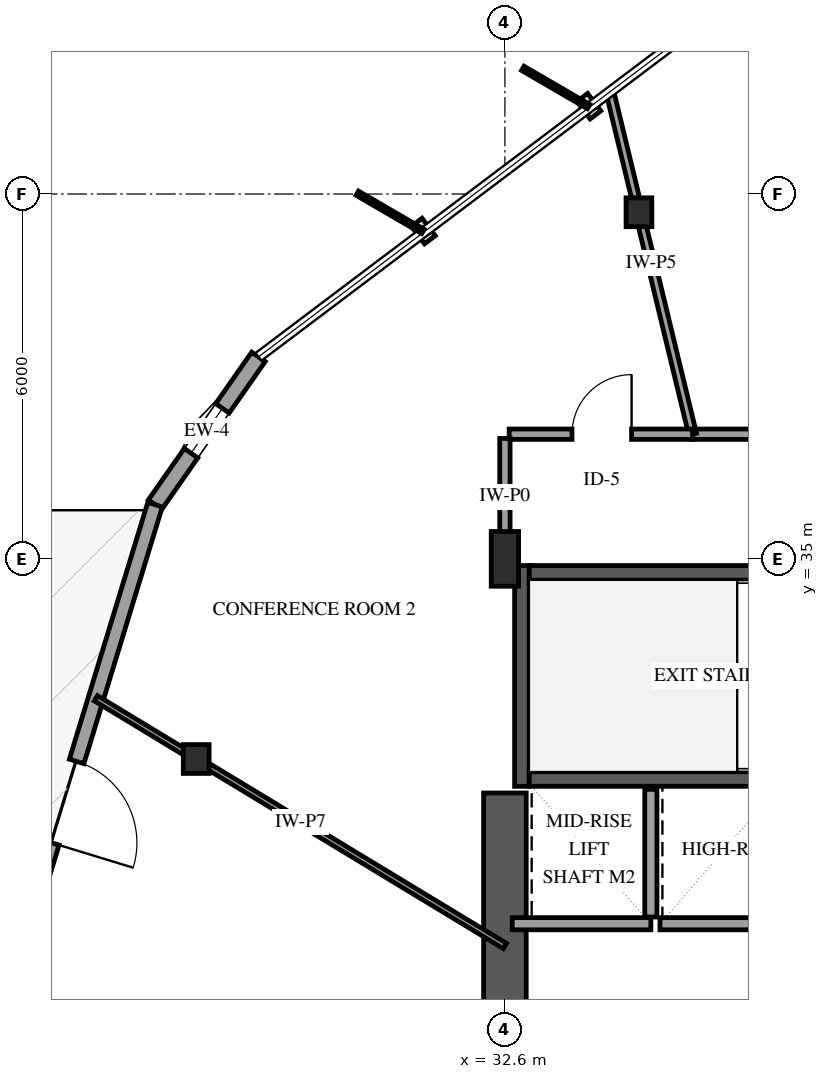
"""IFC4 building model, lengths in metres.
Left out: names, types, materials, properties, quantities, classifications, styles, units other than length and angle.
Written with IfcOpenShell. Run it as: python <this file> out.ifc"""

import sys

from ifc_helpers import new_model, si_unit, direction, frame, frame_2d, origin, origin_2d, place, context, subcontext, project, spatial, rectangle, i_section, extrude, element, fill, save


model = new_model("IFC4")
c1 = context("Model", 3, precision=1e-05, world=origin(), true_north=direction((0.0, 1.0)))
c2 = subcontext(c1, "Body", "Model", "MODEL_VIEW")
j1 = project(units=[si_unit("LENGTHUNIT", "METRE"), si_unit("PLANEANGLEUNIT", "RADIAN")], contexts=[c1])
p1 = place(None, origin())
s1 = spatial("IfcSite", under=j1, at=p1, CompositionType="ELEMENT")
p2 = place(p1, origin())
s2 = spatial("IfcBuilding", under=s1, at=p2, CompositionType="ELEMENT")
p3 = place(p2, frame((0.0, 0.0, 30.6)))
s3 = spatial("IfcBuildingStorey", under=s2, at=p3, CompositionType="ELEMENT", Elevation=30.6)
p4 = place(p3, frame((32.88, 31.26, 0.0), z_axis=(0.0, 0.0, 1.0), x_axis=(0.0, 1.0, 0.0)))
e1 = element("IfcWall", 1, at=p4, inside=s3, PredefinedType="SHEAR", context=c2, shape_type="SweptSolid", body=[
    extrude(rectangle(XDim=3.63, YDim=0.24, at=frame_2d((1.815, 0.0))), origin(), (0.0, 0.0, 1.0), 4.0),
])
for number, where, z_axis, x_axis in (
    (2, (33.0, 31.38, 0.0), (0.0, 0.0, 1.0), (1.0, 0.0, 0.0)),
    (3, (33.0, 34.77, 0.0), (0.0, 0.0, 1.0), (1.0, 0.0, 0.0)),
):
    element("IfcWall", number, at=place(p3, frame(where, z_axis=z_axis, x_axis=x_axis)), inside=s3, PredefinedType="SHEAR", context=c2, shape_type="SweptSolid", body=[
        extrude(rectangle(XDim=8.0, YDim=0.24, at=frame_2d((4.0, 0.0))), origin(), (0.0, 0.0, 1.0), 4.0),
    ])
p5 = place(p3, frame((32.6, 18.85, 0.0), z_axis=(0.0, 0.0, 1.0), x_axis=(0.0, 1.0, 0.0)))
e4 = element("IfcWall", 4, at=p5, inside=s3, PredefinedType="SHEAR", context=c2, shape_type="SweptSolid", body=[
    extrude(rectangle(XDim=12.3, YDim=0.7, at=frame_2d((6.15, 0.0))), origin(), (0.0, 0.0, 1.0), 4.0),
])
p6 = place(p3, frame((32.6, 35.0, -0.3), z_axis=(0.0, 0.0, 1.0), x_axis=(1.0, 0.0, 0.0)))
e5 = element("IfcColumn", 5, at=p6, inside=s3, PredefinedType="PILASTER", context=c2, shape_type="SweptSolid", body=[
    extrude(rectangle(XDim=0.45, YDim=0.9, at=origin_2d()), origin(), (0.0, 0.0, 1.0), 4.3),
])
for number, where, z_axis, x_axis in (
    (6, (34.804, 40.7, -0.3), (0.0, 0.0, 1.0), (1.0, 0.0, 0.0)),
    (7, (27.523, 31.708, -0.3), (0.0, 0.0, 1.0), (1.0, 0.0, 0.0)),
):
    element("IfcColumn", number, at=place(p3, frame(where, z_axis=z_axis, x_axis=x_axis)), inside=s3, PredefinedType="COLUMN", context=c2, shape_type="SweptSolid", body=[
        extrude(i_section(OverallWidth=0.424, OverallDepth=0.474, WebThickness=0.048, FlangeThickness=0.077, FilletRadius=0.038, at=origin_2d()), origin(), (0.0, 0.0, 1.0), 4.3),
    ])
p7 = place(p3, frame((28.547, 38.322, 0.0), z_axis=(0.0, 0.0, 1.0), x_axis=(-0.573285584338, -0.819355624128, 0.0)))
e8 = element("IfcWall", 8, at=p7, inside=s3, PredefinedType="SOLIDWALL", context=c2, shape_type="SweptSolid", body=[
    extrude(rectangle(XDim=2.967, YDim=0.27, at=frame_2d((1.483, 0.0))), origin(), (0.0, 0.0, 1.0), 3.079),
])
p8 = place(p7, frame((1.033, 0.0, 0.75)))
e9 = element("IfcOpeningElement", 9, at=p8, cuts=e8, PredefinedType="OPENING", context=c2, shape_type="SweptSolid", body=[
    extrude(rectangle(XDim=0.9, YDim=1.5, at=frame_2d((0.45, 0.75))), frame((0.0, 0.145, 0.0), z_axis=(0.0, -1.0, 0.0), x_axis=(1.0, 0.0, 0.0)), (0.0, 0.0, 1.0), 0.29),
])
p9 = place(p3, frame((26.846, 35.891, 0.0), z_axis=(0.0, 0.0, 1.0), x_axis=(-0.292034213335, -0.956407872323, 0.0)))
e10 = element("IfcWall", 10, at=p9, inside=s3, PredefinedType="SOLIDWALL", context=c2, shape_type="SweptSolid", body=[
    extrude(rectangle(XDim=10.23, YDim=0.25, at=frame_2d((5.115, 0.0))), origin(), (0.0, 0.0, 1.0), 3.079),
])
p10 = place(p9, frame((4.415, 0.0, 0.0)))
e11 = element("IfcOpeningElement", 11, at=p10, cuts=e10, PredefinedType="OPENING", context=c2, shape_type="SweptSolid", body=[
    extrude(rectangle(XDim=1.4, YDim=2.2, at=frame_2d((0.7, 1.1))), frame((0.0, 0.135, 0.0), z_axis=(0.0, -1.0, 0.0), x_axis=(1.0, 0.0, 0.0)), (0.0, 0.0, 1.0), 0.27),
])
p11 = place(p3, frame((32.72, 29.0, 0.0), z_axis=(0.0, 0.0, 1.0), x_axis=(1.0, 0.0, 0.0)))
e12 = element("IfcWall", 12, at=p11, inside=s3, PredefinedType="SOLIDWALL", context=c2, shape_type="SweptSolid", body=[
    extrude(rectangle(XDim=2.28, YDim=0.2, at=frame_2d((1.14, 0.0))), origin(), (0.0, 0.0, 1.0), 3.7),
])
p12 = place(p3, frame((35.0, 29.11, 0.0), z_axis=(0.0, 0.0, 1.0), x_axis=(0.0, 1.0, 0.0)))
e13 = element("IfcWall", 13, at=p12, inside=s3, PredefinedType="SOLIDWALL", context=c2, shape_type="SweptSolid", body=[
    extrude(rectangle(XDim=2.1, YDim=0.2, at=frame_2d((1.05, 0.0))), origin(), (0.0, 0.0, 1.0), 3.7),
])
p13 = place(p3, frame((35.15, 29.0, 0.0), z_axis=(0.0, 0.0, 1.0), x_axis=(1.0, 0.0, 0.0)))
e14 = element("IfcWall", 14, at=p13, inside=s3, PredefinedType="SOLIDWALL", context=c2, shape_type="SweptSolid", body=[
    extrude(rectangle(XDim=2.0, YDim=0.2, at=frame_2d((1.0, 0.0))), origin(), (0.0, 0.0, 1.0), 3.7),
])
p14 = place(p3, frame((35.687, 37.05, 0.0), z_axis=(0.0, 0.0, 1.0), x_axis=(1.0, 0.0, 0.0)))
e15 = element("IfcWall", 15, at=p14, inside=s3, PredefinedType="PARTITIONING", context=c2, shape_type="SweptSolid", body=[
    extrude(rectangle(XDim=10.893, YDim=0.17, at=frame_2d((5.447, 0.0))), origin(), (0.0, 0.0, 1.0), 3.7),
])
p15 = place(p14, frame((4.972, 0.0, 0.0)))
e16 = element("IfcOpeningElement", 16, at=p15, cuts=e15, PredefinedType="OPENING", context=c2, shape_type="SweptSolid", body=[
    extrude(rectangle(XDim=0.98, YDim=2.15, at=frame_2d((0.49, 1.075))), frame((0.0, 0.095, 0.0), z_axis=(0.0, -1.0, 0.0), x_axis=(1.0, 0.0, 0.0)), (0.0, 0.0, 1.0), 0.19),
])
p16 = place(p3, frame((32.6, 28.634, 0.0), z_axis=(0.0, 0.0, 1.0), x_axis=(-0.855390028233, 0.517984458839, 0.0)))
e17 = element("IfcWall", 17, at=p16, inside=s3, PredefinedType="PARTITIONING", context=c2, shape_type="SweptSolid", body=[
    extrude(rectangle(XDim=7.863, YDim=0.1, at=frame_2d((3.932, 0.0))), origin(), (0.0, 0.0, 1.0), 3.074),
])
p17 = place(p3, frame((35.687, 37.05, 0.0), z_axis=(0.0, 0.0, 1.0), x_axis=(-0.234990748456, 0.971997607065, 0.0)))
e18 = element("IfcWall", 18, at=p17, inside=s3, PredefinedType="PARTITIONING", context=c2, shape_type="SweptSolid", body=[
    extrude(rectangle(XDim=5.792, YDim=0.13, at=frame_2d((2.896, 0.0))), origin(), (0.0, 0.0, 1.0), 2.995),
])
p18 = place(p3, frame((32.67, 37.05, 0.0), z_axis=(0.0, 0.0, 1.0), x_axis=(1.0, 0.0, 0.0)))
e19 = element("IfcWall", 19, at=p18, inside=s3, PredefinedType="PARTITIONING", context=c2, shape_type="SweptSolid", body=[
    extrude(rectangle(XDim=3.017, YDim=0.17, at=frame_2d((1.509, 0.0))), origin(), (0.0, 0.0, 1.0), 3.7),
])
p19 = place(p18, frame((1.033, 0.0, 0.0)))
e20 = element("IfcOpeningElement", 20, at=p19, cuts=e19, PredefinedType="OPENING", context=c2, shape_type="SweptSolid", body=[
    extrude(rectangle(XDim=0.98, YDim=2.15, at=frame_2d((0.49, 1.075))), frame((0.0, 0.095, 0.0), z_axis=(0.0, -1.0, 0.0), x_axis=(1.0, 0.0, 0.0)), (0.0, 0.0, 1.0), 0.19),
])
p20 = place(p3, frame((32.6, 35.07, 0.0), z_axis=(0.0, 0.0, 1.0), x_axis=(0.0, 1.0, 0.0)))
e21 = element("IfcWall", 21, at=p20, inside=s3, PredefinedType="PARTITIONING", context=c2, shape_type="SweptSolid", body=[
    extrude(rectangle(XDim=1.91, YDim=0.17, at=frame_2d((0.955, 0.0))), origin(), (0.0, 0.0, 1.0), 3.7),
])
p21 = place(p8, origin())
e22 = element("IfcWindow", 22, at=p21, inside=s3, PartitioningType="SINGLE_PANEL", PredefinedType="WINDOW", context=c2, shape_type="SweptSolid", body=[
    extrude(rectangle(XDim=0.9, YDim=1.5, at=frame_2d((0.45, 0.75))), frame((0.0, 0.03, 0.0), z_axis=(0.0, -1.0, 0.0), x_axis=(1.0, 0.0, 0.0)), (0.0, 0.0, 1.0), 0.06),
])
fill(e9, e22)
p22 = place(p10, origin())
e23 = element("IfcDoor", 23, at=p22, inside=s3, OperationType="SINGLE_SWING_RIGHT", PredefinedType="DOOR", context=c2, shape_type="SweptSolid", body=[
    extrude(rectangle(XDim=1.4, YDim=2.2, at=frame_2d((0.7, 1.1))), frame((0.0, 0.025, 0.0), z_axis=(0.0, -1.0, 0.0), x_axis=(1.0, 0.0, 0.0)), (0.0, 0.0, 1.0), 0.05),
])
fill(e11, e23)
p23 = place(p19, origin())
e24 = element("IfcDoor", 24, at=p23, inside=s3, OperationType="SINGLE_SWING_RIGHT", PredefinedType="DOOR", context=c2, shape_type="SweptSolid", body=[
    extrude(rectangle(XDim=0.98, YDim=2.15, at=frame_2d((0.49, 1.075))), frame((0.0, 0.025, 0.0), z_axis=(0.0, -1.0, 0.0), x_axis=(1.0, 0.0, 0.0)), (0.0, 0.0, 1.0), 0.05),
])
fill(e20, e24)
save(model, sys.argv[1])
